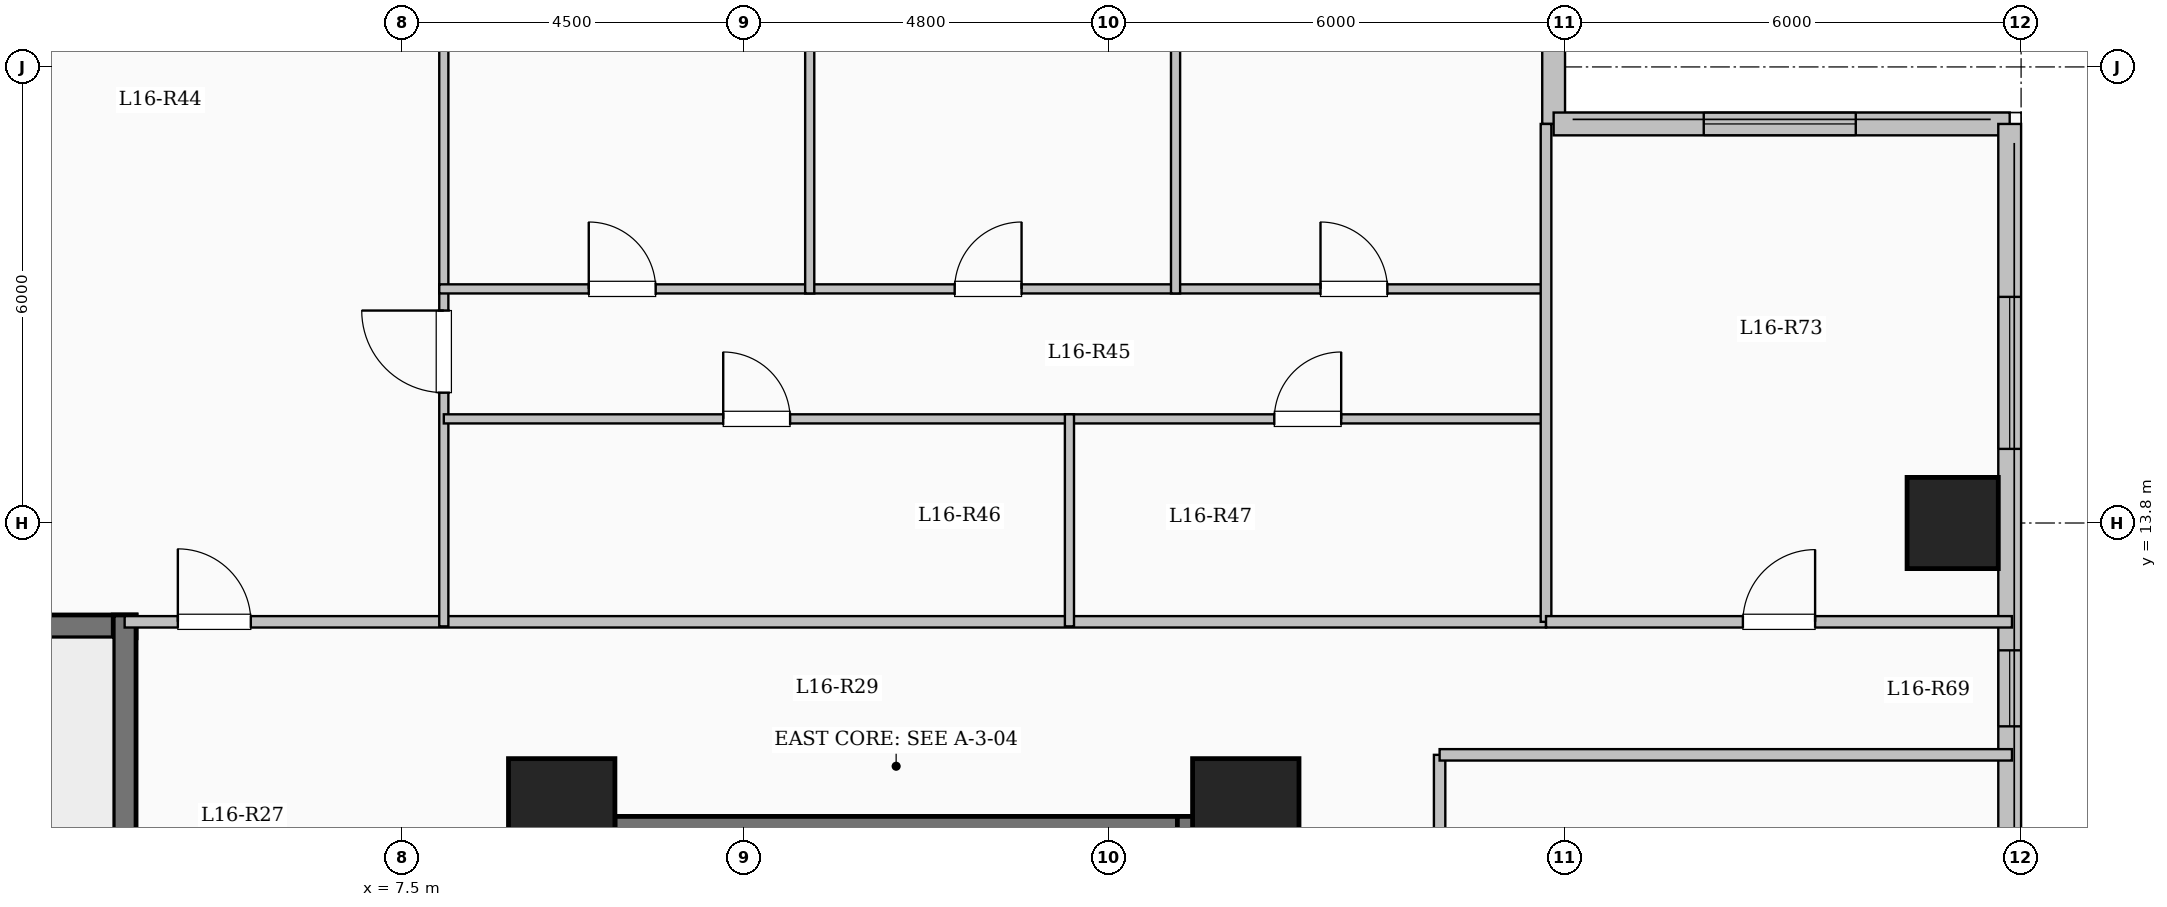
"""IFC4 building model, lengths in metres.
Left out: names, types, materials, properties, quantities, classifications, styles, units other than length and angle.
Written with IfcOpenShell. Run it as: python <this file> out.ifc"""

import sys

from ifc_helpers import new_model, si_unit, direction, frame, frame_2d, origin, origin_2d, place, context, subcontext, project, spatial, rectangle, extrude, element, fill, save


model = new_model("IFC4")
c1 = context("Model", 3, precision=1e-05, world=origin(), true_north=direction((0.0, 1.0)))
c2 = subcontext(c1, "Body", "Model", "MODEL_VIEW")
j1 = project(units=[si_unit("LENGTHUNIT", "METRE"), si_unit("PLANEANGLEUNIT", "RADIAN")], contexts=[c1])
p1 = place(None, origin())
s1 = spatial("IfcSite", under=j1, at=p1, CompositionType="ELEMENT")
p2 = place(p1, origin())
s2 = spatial("IfcBuilding", under=s1, at=p2, CompositionType="ELEMENT")
p3 = place(p2, frame((0.0, 0.0, 60.85)))
s3 = spatial("IfcBuildingStorey", under=s2, at=p3, CompositionType="ELEMENT", Elevation=60.85)
for number, where, z_axis, x_axis in (
    (1, (9.6, 10.0, 0.0), (0.0, 0.0, 1.0), (1.0, 0.0, 0.0)),
    (2, (18.6, 10.0, 0.0), (0.0, 0.0, 1.0), (1.0, 0.0, 0.0)),
):
    element("IfcColumn", number, at=place(p3, frame(where, z_axis=z_axis, x_axis=x_axis)), inside=s3, PredefinedType="COLUMN", context=c2, shape_type="SweptSolid", body=[
        extrude(rectangle(XDim=1.4, YDim=1.4, at=origin_2d()), origin(), (0.0, 0.0, 1.0), 3.35),
    ])
p4 = place(p3, frame((27.9, 13.8, 0.0), z_axis=(0.0, 0.0, 1.0), x_axis=(1.0, 0.0, 0.0)))
e3 = element("IfcColumn", 3, at=p4, inside=s3, PredefinedType="COLUMN", context=c2, shape_type="SweptSolid", body=[
    extrude(rectangle(XDim=1.2, YDim=1.2, at=origin_2d()), origin(), (0.0, 0.0, 1.0), 3.35),
])
p5 = place(p3, frame((22.65, 23.55, 0.0), z_axis=(0.0, 0.0, 1.0), x_axis=(0.0, -1.0, 0.0)))
e4 = element("IfcWall", 4, at=p5, inside=s3, PredefinedType="SOLIDWALL", context=c2, shape_type="SweptSolid", body=[
    extrude(rectangle(XDim=4.5, YDim=0.3, at=frame_2d((2.25, 0.0))), origin(), (0.0, 0.0, 1.0), 3.05),
])
p6 = place(p5, frame((1.367, 0.0, 0.9)))
e5 = element("IfcOpeningElement", 5, at=p6, cuts=e4, PredefinedType="OPENING", context=c2, shape_type="SweptSolid", body=[
    extrude(rectangle(XDim=1.8, YDim=1.65, at=frame_2d((0.9, 0.825))), frame((0.0, 0.16, 0.0), z_axis=(0.0, -1.0, 0.0), x_axis=(1.0, 0.0, 0.0)), (0.0, 0.0, 1.0), 0.32),
])
p7 = place(p3, frame((22.65, 19.05, 0.0), z_axis=(0.0, 0.0, 1.0), x_axis=(1.0, 0.0, 0.0)))
e6 = element("IfcWall", 6, at=p7, inside=s3, PredefinedType="SOLIDWALL", context=c2, shape_type="SweptSolid", body=[
    extrude(rectangle(XDim=6.0, YDim=0.3, at=frame_2d((3.0, 0.0))), origin(), (0.0, 0.0, 1.0), 3.05),
])
p8 = place(p7, frame((1.975, 0.0, 0.9)))
e7 = element("IfcOpeningElement", 7, at=p8, cuts=e6, PredefinedType="OPENING", context=c2, shape_type="SweptSolid", body=[
    extrude(rectangle(XDim=2.0, YDim=1.7, at=frame_2d((1.0, 0.85))), frame((0.0, 0.16, 0.0), z_axis=(0.0, -1.0, 0.0), x_axis=(1.0, 0.0, 0.0)), (0.0, 0.0, 1.0), 0.32),
])
p9 = place(p3, frame((28.65, 19.05, 0.0), z_axis=(0.0, 0.0, 1.0), x_axis=(0.0, -1.0, 0.0)))
e8 = element("IfcWall", 8, at=p9, inside=s3, PredefinedType="SOLIDWALL", context=c2, shape_type="SweptSolid", body=[
    extrude(rectangle(XDim=38.1, YDim=0.3, at=frame_2d((19.05, 0.0))), origin(), (0.0, 0.0, 1.0), 3.05),
])
p10 = place(p9, frame((2.275, 0.0, 0.9)))
e9 = element("IfcOpeningElement", 9, at=p10, cuts=e8, PredefinedType="OPENING", context=c2, shape_type="SweptSolid", body=[
    extrude(rectangle(XDim=2.0, YDim=1.7, at=frame_2d((1.0, 0.85))), frame((0.0, 0.16, 0.0), z_axis=(0.0, -1.0, 0.0), x_axis=(1.0, 0.0, 0.0)), (0.0, 0.0, 1.0), 0.32),
])
p11 = place(p9, frame((6.925, 0.0, 0.95)))
e10 = element("IfcOpeningElement", 10, at=p11, cuts=e8, PredefinedType="OPENING", context=c2, shape_type="SweptSolid", body=[
    extrude(rectangle(XDim=1.0, YDim=1.5, at=frame_2d((0.5, 0.75))), frame((0.0, 0.16, 0.0), z_axis=(0.0, -1.0, 0.0), x_axis=(1.0, 0.0, 0.0)), (0.0, 0.0, 1.0), 0.32),
])
p12 = place(p9, frame((16.3, 0.0, 0.9)))
e11 = element("IfcOpeningElement", 11, at=p12, cuts=e8, PredefinedType="OPENING", context=c2, shape_type="SweptSolid", body=[
    extrude(rectangle(XDim=2.0, YDim=1.7, at=frame_2d((1.0, 0.85))), frame((0.0, 0.16, 0.0), z_axis=(0.0, -1.0, 0.0), x_axis=(1.0, 0.0, 0.0)), (0.0, 0.0, 1.0), 0.32),
])
p13 = place(p9, frame((27.058, 0.0, 0.9)))
e12 = element("IfcOpeningElement", 12, at=p13, cuts=e8, PredefinedType="OPENING", context=c2, shape_type="SweptSolid", body=[
    extrude(rectangle(XDim=1.5, YDim=1.65, at=frame_2d((0.75, 0.825))), frame((0.0, 0.16, 0.0), z_axis=(0.0, -1.0, 0.0), x_axis=(1.0, 0.0, 0.0)), (0.0, 0.0, 1.0), 0.32),
])
p14 = place(p9, frame((32.55, 0.0, 0.9)))
e13 = element("IfcOpeningElement", 13, at=p14, cuts=e8, PredefinedType="OPENING", context=c2, shape_type="SweptSolid", body=[
    extrude(rectangle(XDim=2.4, YDim=1.8, at=frame_2d((1.2, 0.9))), frame((0.0, 0.16, 0.0), z_axis=(0.0, -1.0, 0.0), x_axis=(1.0, 0.0, 0.0)), (0.0, 0.0, 1.0), 0.32),
])
p15 = place(p3, frame((10.0, 9.79, 0.0), z_axis=(0.0, 0.0, 1.0), x_axis=(1.0, 0.0, 0.0)))
e14 = element("IfcWall", 14, at=p15, inside=s3, PredefinedType="SHEAR", context=c2, shape_type="SweptSolid", body=[
    extrude(rectangle(XDim=8.0, YDim=0.3, at=frame_2d((4.0, 0.0))), origin(), (0.0, 0.0, 1.0), 3.35),
])
for number, where, z_axis, x_axis in (
    (15, (10.15, 6.35, 0.0), (0.0, 0.0, 1.0), (0.0, 1.0, 0.0)),
    (16, (17.85, 6.35, 0.0), (0.0, 0.0, 1.0), (0.0, 1.0, 0.0)),
):
    element("IfcWall", number, at=place(p3, frame(where, z_axis=z_axis, x_axis=x_axis)), inside=s3, PredefinedType="SHEAR", context=c2, shape_type="SweptSolid", body=[
        extrude(rectangle(XDim=3.59, YDim=0.3, at=frame_2d((1.795, 0.0))), origin(), (0.0, 0.0, 1.0), 3.35),
    ])
p16 = place(p3, frame((-4.0, 12.44, 0.0), z_axis=(0.0, 0.0, 1.0), x_axis=(1.0, 0.0, 0.0)))
e17 = element("IfcWall", 17, at=p16, inside=s3, PredefinedType="SHEAR", context=c2, shape_type="SweptSolid", body=[
    extrude(rectangle(XDim=8.0, YDim=0.3, at=frame_2d((4.0, 0.0))), origin(), (0.0, 0.0, 1.0), 3.35),
])
p17 = place(p3, frame((3.85, 9.0, 0.0), z_axis=(0.0, 0.0, 1.0), x_axis=(0.0, 1.0, 0.0)))
e18 = element("IfcWall", 18, at=p17, inside=s3, PredefinedType="SHEAR", context=c2, shape_type="SweptSolid", body=[
    extrude(rectangle(XDim=3.59, YDim=0.3, at=frame_2d((1.795, 0.0))), origin(), (0.0, 0.0, 1.0), 3.35),
])
p18 = place(p3, frame((3.85, 12.5, 0.0), z_axis=(0.0, 0.0, 1.0), x_axis=(1.0, 0.0, 0.0)))
e19 = element("IfcWall", 19, at=p18, inside=s3, PredefinedType="PARTITIONING", context=c2, shape_type="SweptSolid", body=[
    extrude(rectangle(XDim=18.7, YDim=0.15, at=frame_2d((9.35, 0.0))), origin(), (0.0, 0.0, 1.0), 3.05),
])
p19 = place(p18, frame((0.7, 0.0, 0.0)))
e20 = element("IfcOpeningElement", 20, at=p19, cuts=e19, PredefinedType="OPENING", context=c2, shape_type="SweptSolid", body=[
    extrude(rectangle(XDim=0.96, YDim=2.15, at=frame_2d((0.48, 1.075))), frame((0.0, 0.085, 0.0), z_axis=(0.0, -1.0, 0.0), x_axis=(1.0, 0.0, 0.0)), (0.0, 0.0, 1.0), 0.17),
])
p20 = place(p3, frame((21.15, -7.25, 0.0), z_axis=(0.0, 0.0, 1.0), x_axis=(0.0, 1.0, 0.0)))
e21 = element("IfcWall", 21, at=p20, inside=s3, PredefinedType="PARTITIONING", context=c2, shape_type="SweptSolid", body=[
    extrude(rectangle(XDim=18.0, YDim=0.15, at=frame_2d((9.0, 0.0))), origin(), (0.0, 0.0, 1.0), 2.535),
])
p21 = place(p3, frame((8.049, 12.44, 0.0), z_axis=(0.0, 0.0, 1.0), x_axis=(0.0, 1.0, 0.0)))
e22 = element("IfcWall", 22, at=p21, inside=s3, PredefinedType="PARTITIONING", context=c2, shape_type="SweptSolid", body=[
    extrude(rectangle(XDim=11.888, YDim=0.12, at=frame_2d((5.944, 0.0))), origin(), (0.0, 0.0, 1.0), 2.385),
])
p22 = place(p21, frame((3.075, 0.0, 0.0)))
e23 = element("IfcOpeningElement", 23, at=p22, cuts=e22, PredefinedType="OPENING", context=c2, shape_type="SweptSolid", body=[
    extrude(rectangle(XDim=1.08, YDim=2.15, at=frame_2d((0.54, 1.075))), frame((0.0, 0.07, 0.0), z_axis=(0.0, -1.0, 0.0), x_axis=(1.0, 0.0, 0.0)), (0.0, 0.0, 1.0), 0.14),
])
p23 = place(p3, frame((8.049, 15.17, 0.0), z_axis=(0.0, 0.0, 1.0), x_axis=(1.0, 0.0, 0.0)))
e24 = element("IfcWall", 24, at=p23, inside=s3, PredefinedType="PARTITIONING", context=c2, shape_type="SweptSolid", body=[
    extrude(rectangle(XDim=8.231, YDim=0.12, at=frame_2d((4.115, 0.0))), origin(), (0.0, 0.0, 1.0), 3.05),
])
p24 = place(p23, frame((3.676, 0.0, 0.0)))
e25 = element("IfcOpeningElement", 25, at=p24, cuts=e24, PredefinedType="OPENING", context=c2, shape_type="SweptSolid", body=[
    extrude(rectangle(XDim=0.88, YDim=2.1, at=frame_2d((0.44, 1.05))), frame((0.0, 0.07, 0.0), z_axis=(0.0, -1.0, 0.0), x_axis=(1.0, 0.0, 0.0)), (0.0, 0.0, 1.0), 0.14),
])
p25 = place(p3, frame((16.28, 15.17, 0.0), z_axis=(0.0, 0.0, 1.0), x_axis=(1.0, 0.0, 0.0)))
e26 = element("IfcWall", 26, at=p25, inside=s3, PredefinedType="PARTITIONING", context=c2, shape_type="SweptSolid", body=[
    extrude(rectangle(XDim=6.27, YDim=0.12, at=frame_2d((3.135, 0.0))), origin(), (0.0, 0.0, 1.0), 3.05),
])
p26 = place(p25, frame((2.695, 0.0, 0.0)))
e27 = element("IfcOpeningElement", 27, at=p26, cuts=e26, PredefinedType="OPENING", context=c2, shape_type="SweptSolid", body=[
    extrude(rectangle(XDim=0.88, YDim=2.1, at=frame_2d((0.44, 1.05))), frame((0.0, 0.07, 0.0), z_axis=(0.0, -1.0, 0.0), x_axis=(1.0, 0.0, 0.0)), (0.0, 0.0, 1.0), 0.14),
])
p27 = place(p3, frame((7.989, 16.88, 0.0), z_axis=(0.0, 0.0, 1.0), x_axis=(1.0, 0.0, 0.0)))
e28 = element("IfcWall", 28, at=p27, inside=s3, PredefinedType="PARTITIONING", context=c2, shape_type="SweptSolid", body=[
    extrude(rectangle(XDim=14.621, YDim=0.12, at=frame_2d((7.311, 0.0))), origin(), (0.0, 0.0, 1.0), 3.05),
])
p28 = place(p27, frame((1.967, 0.0, 0.0)))
e29 = element("IfcOpeningElement", 29, at=p28, cuts=e28, PredefinedType="OPENING", context=c2, shape_type="SweptSolid", body=[
    extrude(rectangle(XDim=0.88, YDim=2.1, at=frame_2d((0.44, 1.05))), frame((0.0, 0.07, 0.0), z_axis=(0.0, -1.0, 0.0), x_axis=(1.0, 0.0, 0.0)), (0.0, 0.0, 1.0), 0.14),
])
p29 = place(p27, frame((6.781, 0.0, 0.0)))
e30 = element("IfcOpeningElement", 30, at=p29, cuts=e28, PredefinedType="OPENING", context=c2, shape_type="SweptSolid", body=[
    extrude(rectangle(XDim=0.88, YDim=2.1, at=frame_2d((0.44, 1.05))), frame((0.0, 0.07, 0.0), z_axis=(0.0, -1.0, 0.0), x_axis=(1.0, 0.0, 0.0)), (0.0, 0.0, 1.0), 0.14),
])
p30 = place(p27, frame((11.594, 0.0, 0.0)))
e31 = element("IfcOpeningElement", 31, at=p30, cuts=e28, PredefinedType="OPENING", context=c2, shape_type="SweptSolid", body=[
    extrude(rectangle(XDim=0.88, YDim=2.1, at=frame_2d((0.44, 1.05))), frame((0.0, 0.07, 0.0), z_axis=(0.0, -1.0, 0.0), x_axis=(1.0, 0.0, 0.0)), (0.0, 0.0, 1.0), 0.14),
])
p31 = place(p3, frame((16.28, 12.44, 0.0), z_axis=(0.0, 0.0, 1.0), x_axis=(0.0, 1.0, 0.0)))
e32 = element("IfcWall", 32, at=p31, inside=s3, PredefinedType="PARTITIONING", context=c2, shape_type="SweptSolid", body=[
    extrude(rectangle(XDim=2.79, YDim=0.12, at=frame_2d((1.395, 0.0))), origin(), (0.0, 0.0, 1.0), 3.05),
])
for number, where, z_axis, x_axis in (
    (33, (12.863, 16.82, 0.0), (0.0, 0.0, 1.0), (0.0, 1.0, 0.0)),
    (34, (17.676, 16.82, 0.0), (0.0, 0.0, 1.0), (0.0, 1.0, 0.0)),
):
    element("IfcWall", number, at=place(p3, frame(where, z_axis=z_axis, x_axis=x_axis)), inside=s3, PredefinedType="PARTITIONING", context=c2, shape_type="SweptSolid", body=[
        extrude(rectangle(XDim=6.78, YDim=0.12, at=frame_2d((3.39, 0.0))), origin(), (0.0, 0.0, 1.0), 3.05),
    ])
p32 = place(p3, frame((21.15, 10.75, 0.0), z_axis=(0.0, 0.0, 1.0), x_axis=(1.0, 0.0, 0.0)))
e35 = element("IfcWall", 35, at=p32, inside=s3, PredefinedType="PARTITIONING", context=c2, shape_type="SweptSolid", body=[
    extrude(rectangle(XDim=7.53, YDim=0.15, at=frame_2d((3.765, 0.0))), origin(), (0.0, 0.0, 1.0), 3.05),
])
p33 = place(p3, frame((22.55, 12.5, 0.0), z_axis=(0.0, 0.0, 1.0), x_axis=(0.0, 1.0, 0.0)))
e36 = element("IfcWall", 36, at=p33, inside=s3, PredefinedType="PARTITIONING", context=c2, shape_type="SweptSolid", body=[
    extrude(rectangle(XDim=6.55, YDim=0.14, at=frame_2d((3.275, 0.0))), origin(), (0.0, 0.0, 1.0), 3.05),
])
p34 = place(p3, frame((22.55, 12.5, 0.0), z_axis=(0.0, 0.0, 1.0), x_axis=(1.0, 0.0, 0.0)))
e37 = element("IfcWall", 37, at=p34, inside=s3, PredefinedType="PARTITIONING", context=c2, shape_type="SweptSolid", body=[
    extrude(rectangle(XDim=6.13, YDim=0.15, at=frame_2d((3.065, 0.0))), origin(), (0.0, 0.0, 1.0), 3.05),
])
p35 = place(p34, frame((2.59, 0.0, 0.0)))
e38 = element("IfcOpeningElement", 38, at=p35, cuts=e37, PredefinedType="OPENING", context=c2, shape_type="SweptSolid", body=[
    extrude(rectangle(XDim=0.95, YDim=2.15, at=frame_2d((0.475, 1.075))), frame((0.0, 0.085, 0.0), z_axis=(0.0, -1.0, 0.0), x_axis=(1.0, 0.0, 0.0)), (0.0, 0.0, 1.0), 0.17),
])
p36 = place(p8, origin())
e39 = element("IfcWindow", 39, at=p36, inside=s3, PartitioningType="SINGLE_PANEL", PredefinedType="WINDOW", context=c2, shape_type="SweptSolid", body=[
    extrude(rectangle(XDim=2.0, YDim=1.7, at=frame_2d((1.0, 0.85))), frame((0.0, 0.03, 0.0), z_axis=(0.0, -1.0, 0.0), x_axis=(1.0, 0.0, 0.0)), (0.0, 0.0, 1.0), 0.06),
])
fill(e7, e39)
p37 = place(p10, origin())
e40 = element("IfcWindow", 40, at=p37, inside=s3, PartitioningType="SINGLE_PANEL", PredefinedType="WINDOW", context=c2, shape_type="SweptSolid", body=[
    extrude(rectangle(XDim=2.0, YDim=1.7, at=frame_2d((1.0, 0.85))), frame((0.0, 0.03, 0.0), z_axis=(0.0, -1.0, 0.0), x_axis=(1.0, 0.0, 0.0)), (0.0, 0.0, 1.0), 0.06),
])
fill(e9, e40)
p38 = place(p11, origin())
e41 = element("IfcWindow", 41, at=p38, inside=s3, PartitioningType="SINGLE_PANEL", PredefinedType="WINDOW", context=c2, shape_type="SweptSolid", body=[
    extrude(rectangle(XDim=1.0, YDim=1.5, at=frame_2d((0.5, 0.75))), frame((0.0, 0.03, 0.0), z_axis=(0.0, -1.0, 0.0), x_axis=(1.0, 0.0, 0.0)), (0.0, 0.0, 1.0), 0.06),
])
fill(e10, e41)
p39 = place(p19, origin())
e42 = element("IfcDoor", 42, at=p39, inside=s3, OperationType="SINGLE_SWING_LEFT", PredefinedType="DOOR", context=c2, shape_type="SweptSolid", body=[
    extrude(rectangle(XDim=0.96, YDim=2.15, at=frame_2d((0.48, 1.075))), frame((0.0, 0.025, 0.0), z_axis=(0.0, -1.0, 0.0), x_axis=(1.0, 0.0, 0.0)), (0.0, 0.0, 1.0), 0.05),
])
fill(e20, e42)
p40 = place(p22, origin())
e43 = element("IfcDoor", 43, at=p40, inside=s3, OperationType="SINGLE_SWING_RIGHT", PredefinedType="DOOR", context=c2, shape_type="SweptSolid", body=[
    extrude(rectangle(XDim=1.08, YDim=2.15, at=frame_2d((0.54, 1.075))), frame((0.0, 0.025, 0.0), z_axis=(0.0, -1.0, 0.0), x_axis=(1.0, 0.0, 0.0)), (0.0, 0.0, 1.0), 0.05),
])
fill(e23, e43)
p41 = place(p24, origin())
e44 = element("IfcDoor", 44, at=p41, inside=s3, OperationType="SINGLE_SWING_LEFT", PredefinedType="DOOR", context=c2, shape_type="SweptSolid", body=[
    extrude(rectangle(XDim=0.88, YDim=2.1, at=frame_2d((0.44, 1.05))), frame((0.0, 0.025, 0.0), z_axis=(0.0, -1.0, 0.0), x_axis=(1.0, 0.0, 0.0)), (0.0, 0.0, 1.0), 0.05),
])
fill(e25, e44)
p42 = place(p26, origin())
e45 = element("IfcDoor", 45, at=p42, inside=s3, OperationType="SINGLE_SWING_RIGHT", PredefinedType="DOOR", context=c2, shape_type="SweptSolid", body=[
    extrude(rectangle(XDim=0.88, YDim=2.1, at=frame_2d((0.44, 1.05))), frame((0.0, 0.025, 0.0), z_axis=(0.0, -1.0, 0.0), x_axis=(1.0, 0.0, 0.0)), (0.0, 0.0, 1.0), 0.05),
])
fill(e27, e45)
p43 = place(p28, origin())
e46 = element("IfcDoor", 46, at=p43, inside=s3, OperationType="SINGLE_SWING_LEFT", PredefinedType="DOOR", context=c2, shape_type="SweptSolid", body=[
    extrude(rectangle(XDim=0.88, YDim=2.1, at=frame_2d((0.44, 1.05))), frame((0.0, 0.025, 0.0), z_axis=(0.0, -1.0, 0.0), x_axis=(1.0, 0.0, 0.0)), (0.0, 0.0, 1.0), 0.05),
])
fill(e29, e46)
p44 = place(p29, origin())
e47 = element("IfcDoor", 47, at=p44, inside=s3, OperationType="SINGLE_SWING_RIGHT", PredefinedType="DOOR", context=c2, shape_type="SweptSolid", body=[
    extrude(rectangle(XDim=0.88, YDim=2.1, at=frame_2d((0.44, 1.05))), frame((0.0, 0.025, 0.0), z_axis=(0.0, -1.0, 0.0), x_axis=(1.0, 0.0, 0.0)), (0.0, 0.0, 1.0), 0.05),
])
fill(e30, e47)
p45 = place(p30, origin())
e48 = element("IfcDoor", 48, at=p45, inside=s3, OperationType="SINGLE_SWING_LEFT", PredefinedType="DOOR", context=c2, shape_type="SweptSolid", body=[
    extrude(rectangle(XDim=0.88, YDim=2.1, at=frame_2d((0.44, 1.05))), frame((0.0, 0.025, 0.0), z_axis=(0.0, -1.0, 0.0), x_axis=(1.0, 0.0, 0.0)), (0.0, 0.0, 1.0), 0.05),
])
fill(e31, e48)
p46 = place(p35, origin())
e49 = element("IfcDoor", 49, at=p46, inside=s3, OperationType="SINGLE_SWING_RIGHT", PredefinedType="DOOR", context=c2, shape_type="SweptSolid", body=[
    extrude(rectangle(XDim=0.95, YDim=2.15, at=frame_2d((0.475, 1.075))), frame((0.0, 0.025, 0.0), z_axis=(0.0, -1.0, 0.0), x_axis=(1.0, 0.0, 0.0)), (0.0, 0.0, 1.0), 0.05),
])
fill(e38, e49)
save(model, sys.argv[1])
